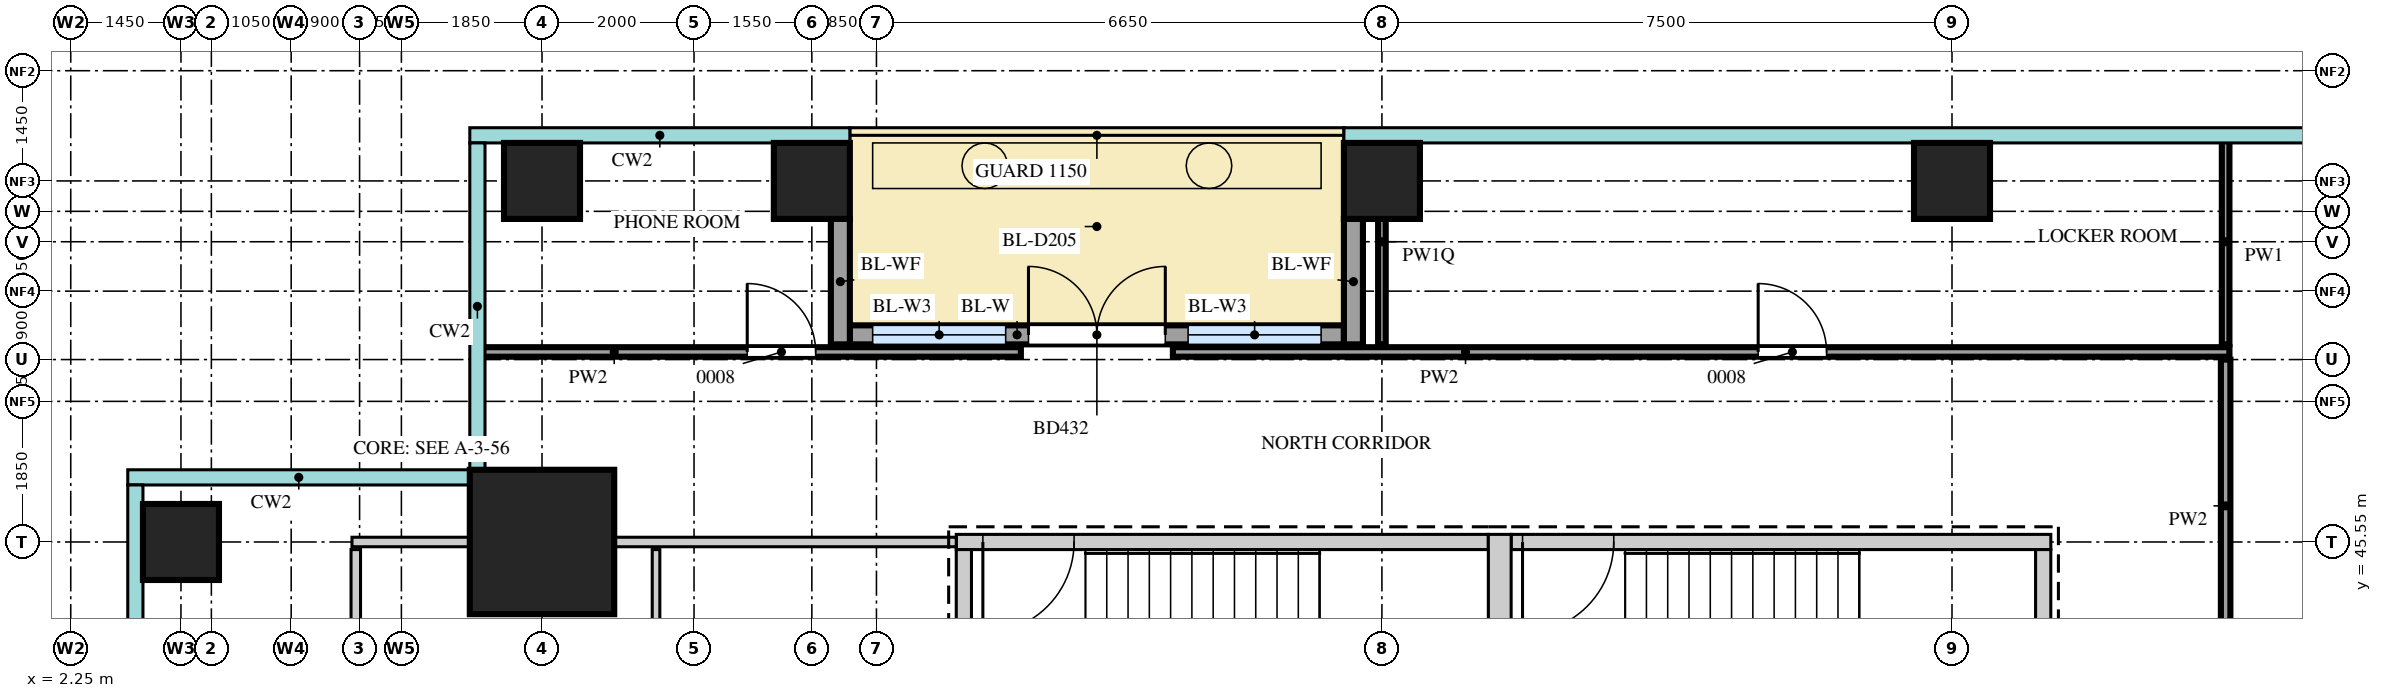
"""IFC4 building model, lengths in metres.
Left out: names, types, materials, properties, quantities, classifications, styles, units other than length and angle.
Written with IfcOpenShell. Run it as: python <this file> out.ifc"""

import sys

from ifc_helpers import new_model, si_unit, direction, frame, frame_2d, origin, origin_2d, place, context, subcontext, project, spatial, rectangle, extrude, source, transform, mapped, element, fill, save


model = new_model("IFC4")
c1 = context("Model", 3, precision=1e-05, world=origin(), true_north=direction((0.0, 1.0)))
c2 = subcontext(c1, "Body", "Model", "MODEL_VIEW")
j1 = project(units=[si_unit("LENGTHUNIT", "METRE"), si_unit("PLANEANGLEUNIT", "RADIAN")], contexts=[c1])
p1 = place(None, origin())
s1 = spatial("IfcSite", under=j1, at=p1, CompositionType="ELEMENT")
p2 = place(p1, origin())
s2 = spatial("IfcBuilding", under=s1, at=p2, CompositionType="ELEMENT")
p3 = place(p2, frame((0.0, 0.0, 196.7)))
s3 = spatial("IfcBuildingStorey", under=s2, at=p3, CompositionType="ELEMENT", Elevation=196.7)
m1 = source(origin(), c2, "Body", "SweptSolid", [
    extrude(rectangle(XDim=7.0, YDim=0.2, at=frame_2d((3.5, 0.0))), origin(), (0.0, 0.0, 1.0), 3.75),
])
p4 = place(p3, frame((13.9, 45.55, 0.0), z_axis=(0.0, 0.0, 1.0), x_axis=(1.0, 0.0, 0.0)))
e1 = element("IfcWall", 1, at=p4, inside=s3, PredefinedType="SHEAR", context=c2, shape_type="MappedRepresentation", body=[
    mapped(m1, transform((0.0, 0.0, 0.0))),
])
m2 = source(origin(), c2, "Body", "SweptSolid", [
    extrude(rectangle(XDim=1.2, YDim=2.1, at=frame_2d((0.6, 1.05))), frame((0.0, 0.11, 0.0), z_axis=(0.0, -1.0, 0.0), x_axis=(1.0, 0.0, 0.0)), (0.0, 0.0, 1.0), 0.22),
])
p5 = place(p4, frame((0.35, 0.0, 0.0)))
e2 = element("IfcOpeningElement", 2, at=p5, cuts=e1, PredefinedType="OPENING", context=c2, shape_type="MappedRepresentation", body=[
    mapped(m2, transform((0.0, 0.0, 0.0))),
])
m3 = source(origin(), c2, "Body", "SweptSolid", [
    extrude(rectangle(XDim=7.1, YDim=0.2, at=frame_2d((3.55, 0.0))), origin(), (0.0, 0.0, 1.0), 3.75),
])
p6 = place(p3, frame((21.2, 45.55, 0.0), z_axis=(0.0, 0.0, 1.0), x_axis=(1.0, 0.0, 0.0)))
e3 = element("IfcWall", 3, at=p6, inside=s3, PredefinedType="SHEAR", context=c2, shape_type="MappedRepresentation", body=[
    mapped(m3, transform((0.0, 0.0, 0.0))),
])
p7 = place(p6, frame((0.15, 0.0, 0.0)))
e4 = element("IfcOpeningElement", 4, at=p7, cuts=e3, PredefinedType="OPENING", context=c2, shape_type="MappedRepresentation", body=[
    mapped(m2, transform((0.0, 0.0, 0.0))),
])
m4 = source(origin(), c2, "Body", "SweptSolid", [
    extrude(rectangle(XDim=3.75, YDim=0.3, at=frame_2d((1.875, 0.0))), origin(), (0.0, 0.0, 1.0), 3.75),
])
p8 = place(p3, frame((21.05, 41.9, 0.0), z_axis=(0.0, 0.0, 1.0), x_axis=(0.0, 1.0, 0.0)))
e5 = element("IfcWall", 5, at=p8, inside=s3, PredefinedType="SHEAR", context=c2, shape_type="MappedRepresentation", body=[
    mapped(m4, transform((0.0, 0.0, 0.0))),
])
m5 = source(origin(), c2, "Body", "SweptSolid", [
    extrude(rectangle(XDim=3.35, YDim=0.2, at=frame_2d((1.675, 0.0))), origin(), (0.0, 0.0, 1.0), 3.75),
])
for number, where, z_axis, x_axis in (
    (6, (14.0, 42.1, 0.0), (0.0, 0.0, 1.0), (0.0, 1.0, 0.0)),
    (7, (28.2, 42.1, 0.0), (0.0, 0.0, 1.0), (0.0, 1.0, 0.0)),
):
    element("IfcWall", number, at=place(p3, frame(where, z_axis=z_axis, x_axis=x_axis)), inside=s3, PredefinedType="SHEAR", context=c2, shape_type="MappedRepresentation", body=[
        mapped(m5, transform((0.0, 0.0, 0.0))),
    ])
m6 = source(origin(), c2, "Body", "SweptSolid", [
    extrude(rectangle(XDim=1.9, YDim=1.9, at=origin_2d()), origin(), (0.0, 0.0, 1.0), 4.0),
])
p9 = place(p3, frame((8.45, 45.55, 0.0), z_axis=(0.0, 0.0, 1.0), x_axis=(1.0, 0.0, 0.0)))
e8 = element("IfcColumn", 8, at=p9, inside=s3, PredefinedType="COLUMN", context=c2, shape_type="MappedRepresentation", body=[
    mapped(m6, transform((0.0, 0.0, 0.0))),
])
m7 = source(origin(), c2, "Body", "SweptSolid", [
    extrude(rectangle(XDim=1.0, YDim=1.0, at=origin_2d()), origin(), (0.0, 0.0, 1.0), 3.75),
])
for number, where, z_axis, x_axis in (
    (9, (8.45, 50.3, 0.0), (0.0, 0.0, 1.0), (1.0, 0.0, 0.0)),
    (10, (12.0, 50.3, 0.0), (0.0, 0.0, 1.0), (1.0, 0.0, 0.0)),
    (11, (19.5, 50.3, 0.0), (0.0, 0.0, 1.0), (1.0, 0.0, 0.0)),
    (12, (27.0, 50.3, 0.0), (0.0, 0.0, 1.0), (1.0, 0.0, 0.0)),
    (13, (3.7, 45.55, 0.0), (0.0, 0.0, 1.0), (1.0, 0.0, 0.0)),
):
    element("IfcColumn", number, at=place(p3, frame(where, z_axis=z_axis, x_axis=x_axis)), inside=s3, PredefinedType="COLUMN", context=c2, shape_type="MappedRepresentation", body=[
        mapped(m7, transform((0.0, 0.0, 0.0))),
    ])
m8 = source(origin(), c2, "Body", "SweptSolid", [
    extrude(rectangle(XDim=6.5, YDim=0.25, at=frame_2d((3.25, 0.0))), origin(), (0.0, 0.0, 1.0), 3.75),
])
p10 = place(p3, frame((12.5, 48.275, 0.0), z_axis=(0.0, 0.0, 1.0), x_axis=(1.0, 0.0, 0.0)))
e14 = element("IfcWall", 14, at=p10, inside=s3, PredefinedType="SOLIDWALL", context=c2, shape_type="MappedRepresentation", body=[
    mapped(m8, transform((0.0, 0.0, 0.0))),
])
m9 = source(origin(), c2, "Body", "SweptSolid", [
    extrude(rectangle(XDim=1.75, YDim=2.4, at=frame_2d((0.875, 1.2))), frame((0.0, 0.135, 0.0), z_axis=(0.0, -1.0, 0.0), x_axis=(1.0, 0.0, 0.0)), (0.0, 0.0, 1.0), 0.27),
])
p11 = place(p10, frame((0.3, 0.0, 0.0)))
e15 = element("IfcOpeningElement", 15, at=p11, cuts=e14, PredefinedType="OPENING", context=c2, shape_type="MappedRepresentation", body=[
    mapped(m9, transform((0.0, 0.0, 0.0))),
])
p12 = place(p10, frame((4.45, 0.0, 0.0)))
e16 = element("IfcOpeningElement", 16, at=p12, cuts=e14, PredefinedType="OPENING", context=c2, shape_type="MappedRepresentation", body=[
    mapped(m9, transform((0.0, 0.0, 0.0))),
])
m10 = source(origin(), c2, "Body", "SweptSolid", [
    extrude(rectangle(XDim=1.8, YDim=2.4, at=frame_2d((0.9, 1.2))), frame((0.0, 0.135, 0.0), z_axis=(0.0, -1.0, 0.0), x_axis=(1.0, 0.0, 0.0)), (0.0, 0.0, 1.0), 0.27),
])
p13 = place(p10, frame((2.35, 0.0, 0.0)))
e17 = element("IfcOpeningElement", 17, at=p13, cuts=e14, PredefinedType="OPENING", context=c2, shape_type="MappedRepresentation", body=[
    mapped(m10, transform((0.0, 0.0, 0.0))),
])
m11 = source(origin(), c2, "Body", "SweptSolid", [
    extrude(rectangle(XDim=1.65, YDim=0.25, at=frame_2d((0.825, 0.0))), origin(), (0.0, 0.0, 1.0), 3.45),
])
for number, where, z_axis, x_axis in (
    (18, (12.375, 49.8, 0.0), (0.0, 0.0, 1.0), (0.0, -1.0, 0.0)),
    (19, (19.125, 49.8, 0.0), (0.0, 0.0, 1.0), (0.0, -1.0, 0.0)),
):
    element("IfcWall", number, at=place(p3, frame(where, z_axis=z_axis, x_axis=x_axis)), inside=s3, PredefinedType="SOLIDWALL", context=c2, shape_type="MappedRepresentation", body=[
        mapped(m11, transform((0.0, 0.0, 0.0))),
    ])
m12 = source(origin(), c2, "Body", "SweptSolid", [
    extrude(rectangle(XDim=3.45, YDim=0.125, at=frame_2d((1.725, 0.0))), origin(), (0.0, 0.0, 1.0), 3.8),
])
p14 = place(p3, frame((6.0, 42.0, 0.0), z_axis=(0.0, 0.0, 1.0), x_axis=(0.0, 1.0, 0.0)))
e20 = element("IfcWall", 20, at=p14, inside=s3, PredefinedType="PARTITIONING", context=c2, shape_type="MappedRepresentation", body=[
    mapped(m12, transform((0.0, 0.0, 0.0))),
])
m13 = source(origin(), c2, "Body", "SweptSolid", [
    extrude(rectangle(XDim=3.45, YDim=0.1, at=frame_2d((1.725, 0.0))), origin(), (0.0, 0.0, 1.0), 3.8),
])
p15 = place(p3, frame((9.95, 42.0, 0.0), z_axis=(0.0, 0.0, 1.0), x_axis=(0.0, 1.0, 0.0)))
e21 = element("IfcWall", 21, at=p15, inside=s3, PredefinedType="PARTITIONING", context=c2, shape_type="MappedRepresentation", body=[
    mapped(m13, transform((0.0, 0.0, 0.0))),
])
m14 = source(origin(), c2, "Body", "SweptSolid", [
    extrude(rectangle(XDim=3.85, YDim=0.125, at=frame_2d((1.925, 0.0))), origin(), (0.0, 0.0, 1.0), 3.8),
])
p16 = place(p3, frame((30.6, 44.1, 0.0), z_axis=(0.0, 0.0, 1.0), x_axis=(0.0, 1.0, 0.0)))
e22 = element("IfcWall", 22, at=p16, inside=s3, PredefinedType="PARTITIONING", context=c2, shape_type="MappedRepresentation", body=[
    mapped(m14, transform((0.0, 0.0, 0.0))),
])
m15 = source(origin(), c2, "Body", "SweptSolid", [
    extrude(rectangle(XDim=7.95, YDim=0.125, at=frame_2d((3.975, 0.0))), origin(), (0.0, 0.0, 1.0), 3.25),
])
p17 = place(p3, frame((5.95, 45.55, 0.0), z_axis=(0.0, 0.0, 1.0), x_axis=(1.0, 0.0, 0.0)))
e23 = element("IfcWall", 23, at=p17, inside=s3, PredefinedType="PARTITIONING", context=c2, shape_type="MappedRepresentation", body=[
    mapped(m15, transform((0.0, 0.0, 0.0))),
])
m16 = source(origin(), c2, "Body", "SweptSolid", [
    extrude(rectangle(XDim=2.7, YDim=0.1, at=frame_2d((1.35, 0.0))), origin(), (0.0, 0.0, 1.0), 3.42),
])
p18 = place(p3, frame((19.5, 48.15, 0.0), z_axis=(0.0, 0.0, 1.0), x_axis=(0.0, 1.0, 0.0)))
e24 = element("IfcWall", 24, at=p18, inside=s3, PredefinedType="PARTITIONING", context=c2, shape_type="MappedRepresentation", body=[
    mapped(m16, transform((0.0, 0.0, 0.0))),
])
m17 = source(origin(), c2, "Body", "SweptSolid", [
    extrude(rectangle(XDim=2.7, YDim=0.1, at=frame_2d((1.35, 0.0))), origin(), (0.0, 0.0, 1.0), 3.8),
])
p19 = place(p3, frame((30.6, 48.15, 0.0), z_axis=(0.0, 0.0, 1.0), x_axis=(0.0, 1.0, 0.0)))
e25 = element("IfcWall", 25, at=p19, inside=s3, PredefinedType="PARTITIONING", context=c2, shape_type="MappedRepresentation", body=[
    mapped(m17, transform((0.0, 0.0, 0.0))),
])
m18 = source(origin(), c2, "Body", "SweptSolid", [
    extrude(rectangle(XDim=7.1, YDim=0.125, at=frame_2d((3.55, 0.0))), origin(), (0.0, 0.0, 1.0), 3.8),
])
p20 = place(p3, frame((7.65, 48.05, 0.0), z_axis=(0.0, 0.0, 1.0), x_axis=(1.0, 0.0, 0.0)))
e26 = element("IfcWall", 26, at=p20, inside=s3, PredefinedType="PARTITIONING", context=c2, shape_type="MappedRepresentation", body=[
    mapped(m18, transform((0.0, 0.0, 0.0))),
])
m19 = source(origin(), c2, "Body", "SweptSolid", [
    extrude(rectangle(XDim=0.9, YDim=2.1, at=frame_2d((0.45, 1.05))), frame((0.0, 0.073, 0.0), z_axis=(0.0, -1.0, 0.0), x_axis=(1.0, 0.0, 0.0)), (0.0, 0.0, 1.0), 0.145),
])
p21 = place(p20, frame((3.5, 0.0, 0.0)))
e27 = element("IfcOpeningElement", 27, at=p21, cuts=e26, PredefinedType="OPENING", context=c2, shape_type="MappedRepresentation", body=[
    mapped(m19, transform((0.0, 0.0, 0.0))),
])
m20 = source(origin(), c2, "Body", "SweptSolid", [
    extrude(rectangle(XDim=13.9, YDim=0.125, at=frame_2d((6.95, 0.0))), origin(), (0.0, 0.0, 1.0), 3.8),
])
p22 = place(p3, frame((16.75, 48.05, 0.0), z_axis=(0.0, 0.0, 1.0), x_axis=(1.0, 0.0, 0.0)))
e28 = element("IfcWall", 28, at=p22, inside=s3, PredefinedType="PARTITIONING", context=c2, shape_type="MappedRepresentation", body=[
    mapped(m20, transform((0.0, 0.0, 0.0))),
])
p23 = place(p22, frame((7.7, 0.0, 0.0)))
e29 = element("IfcOpeningElement", 29, at=p23, cuts=e28, PredefinedType="OPENING", context=c2, shape_type="MappedRepresentation", body=[
    mapped(m19, transform((0.0, 0.0, 0.0))),
])
m21 = source(origin(), c2, "Body", "SweptSolid", [
    extrude(rectangle(XDim=1.75, YDim=2.4, at=frame_2d((0.875, 1.2))), frame((0.0, 0.03, 0.0), z_axis=(0.0, -1.0, 0.0), x_axis=(1.0, 0.0, 0.0)), (0.0, 0.0, 1.0), 0.06),
])
p24 = place(p11, origin())
e30 = element("IfcWindow", 30, at=p24, inside=s3, PartitioningType="SINGLE_PANEL", PredefinedType="WINDOW", context=c2, shape_type="MappedRepresentation", body=[
    mapped(m21, transform((0.0, 0.0, 0.0))),
])
fill(e15, e30)
p25 = place(p12, origin())
e31 = element("IfcWindow", 31, at=p25, inside=s3, PartitioningType="SINGLE_PANEL", PredefinedType="WINDOW", context=c2, shape_type="MappedRepresentation", body=[
    mapped(m21, transform((0.0, 0.0, 0.0))),
])
fill(e16, e31)
m22 = source(origin(), c2, "Body", "SweptSolid", [
    extrude(rectangle(XDim=1.8, YDim=2.4, at=frame_2d((0.9, 1.2))), frame((0.0, 0.025, 0.0), z_axis=(0.0, -1.0, 0.0), x_axis=(1.0, 0.0, 0.0)), (0.0, 0.0, 1.0), 0.05),
])
p26 = place(p13, origin())
e32 = element("IfcDoor", 32, at=p26, inside=s3, OperationType="DOUBLE_DOOR_DOUBLE_SWING", PredefinedType="DOOR", context=c2, shape_type="MappedRepresentation", body=[
    mapped(m22, transform((0.0, 0.0, 0.0))),
])
fill(e17, e32)
m23 = source(origin(), c2, "Body", "SweptSolid", [
    extrude(rectangle(XDim=0.9, YDim=2.1, at=frame_2d((0.45, 1.05))), frame((0.0, 0.025, 0.0), z_axis=(0.0, -1.0, 0.0), x_axis=(1.0, 0.0, 0.0)), (0.0, 0.0, 1.0), 0.05),
])
p27 = place(p21, origin())
e33 = element("IfcDoor", 33, at=p27, inside=s3, OperationType="SINGLE_SWING_RIGHT", PredefinedType="DOOR", context=c2, shape_type="MappedRepresentation", body=[
    mapped(m23, transform((0.0, 0.0, 0.0))),
])
fill(e27, e33)
p28 = place(p23, origin())
e34 = element("IfcDoor", 34, at=p28, inside=s3, OperationType="SINGLE_SWING_RIGHT", PredefinedType="DOOR", context=c2, shape_type="MappedRepresentation", body=[
    mapped(m23, transform((0.0, 0.0, 0.0))),
])
fill(e29, e34)
m24 = source(origin(), c2, "Body", "SweptSolid", [
    extrude(rectangle(XDim=1.2, YDim=2.1, at=frame_2d((0.6, 1.05))), frame((0.0, 0.025, 0.0), z_axis=(0.0, -1.0, 0.0), x_axis=(1.0, 0.0, 0.0)), (0.0, 0.0, 1.0), 0.05),
])
p29 = place(p5, origin())
e35 = element("IfcDoor", 35, at=p29, inside=s3, OperationType="SINGLE_SWING_LEFT", PredefinedType="DOOR", context=c2, shape_type="MappedRepresentation", body=[
    mapped(m24, transform((0.0, 0.0, 0.0))),
])
fill(e2, e35)
p30 = place(p7, origin())
e36 = element("IfcDoor", 36, at=p30, inside=s3, OperationType="SINGLE_SWING_LEFT", PredefinedType="DOOR", context=c2, shape_type="MappedRepresentation", body=[
    mapped(m24, transform((0.0, 0.0, 0.0))),
])
fill(e4, e36)
save(model, sys.argv[1])
